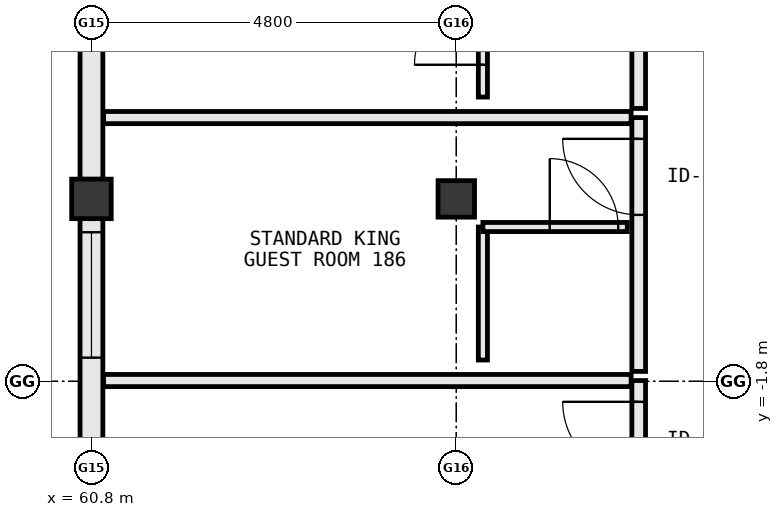
"""IFC4 building model, lengths in metres.
Left out: names, types, materials, properties, quantities, classifications, styles, units other than length and angle.
Written with IfcOpenShell. Run it as: python <this file> out.ifc"""

import sys

from ifc_helpers import new_model, si_unit, direction, frame, frame_2d, origin, origin_2d, place, context, subcontext, project, spatial, rectangle, extrude, element, fill, save


model = new_model("IFC4")
c1 = context("Model", 3, precision=1e-05, world=origin(), true_north=direction((0.0, 1.0)))
c2 = subcontext(c1, "Body", "Model", "MODEL_VIEW")
j1 = project(units=[si_unit("LENGTHUNIT", "METRE"), si_unit("PLANEANGLEUNIT", "RADIAN")], contexts=[c1])
p1 = place(None, origin())
s1 = spatial("IfcSite", under=j1, at=p1, CompositionType="ELEMENT")
p2 = place(p1, origin())
s2 = spatial("IfcBuilding", under=s1, at=p2, CompositionType="ELEMENT")
p3 = place(p2, frame((0.0, 0.0, 27.6)))
s3 = spatial("IfcBuildingStorey", under=s2, at=p3, CompositionType="ELEMENT", Elevation=27.6)
p4 = place(p3, frame((60.8, 0.6, 0.0), z_axis=(0.0, 0.0, 1.0), x_axis=(1.0, 0.0, 0.0)))
e1 = element("IfcColumn", 1, at=p4, inside=s3, PredefinedType="COLUMN", context=c2, shape_type="SweptSolid", body=[
    extrude(rectangle(XDim=0.52, YDim=0.52, at=origin_2d()), origin(), (0.0, 0.0, 1.0), 3.8),
])
p5 = place(p3, frame((65.6, 0.6, 0.0), z_axis=(0.0, 0.0, 1.0), x_axis=(1.0, 0.0, 0.0)))
e2 = element("IfcColumn", 2, at=p5, inside=s3, PredefinedType="COLUMN", context=c2, shape_type="SweptSolid", body=[
    extrude(rectangle(XDim=0.48, YDim=0.48, at=origin_2d()), origin(), (0.0, 0.0, 1.0), 3.8),
])
p6 = place(p3, frame((60.8, 9.942, 0.0), z_axis=(0.0, 0.0, 1.0), x_axis=(0.0, -1.0, 0.0)))
e3 = element("IfcWall", 3, at=p6, inside=s3, PredefinedType="STANDARD", context=c2, shape_type="SweptSolid", body=[
    extrude(rectangle(XDim=9.084, YDim=0.3, at=frame_2d((4.542, 0.0))), origin(), (0.0, 0.0, 1.0), 2.91),
])
p7 = place(p6, frame((5.582, 0.0, 0.85)))
e4 = element("IfcOpeningElement", 4, at=p7, cuts=e3, PredefinedType="OPENING", context=c2, shape_type="SweptSolid", body=[
    extrude(rectangle(XDim=1.8, YDim=1.85, at=frame_2d((0.9, 0.925))), frame((0.0, 0.162, 0.0), z_axis=(0.0, -1.0, 0.0), x_axis=(1.0, 0.0, 0.0)), (0.0, 0.0, 1.0), 0.324),
])
p8 = place(p6, frame((2.122, 0.0, 0.85)))
e5 = element("IfcOpeningElement", 5, at=p8, cuts=e3, PredefinedType="OPENING", context=c2, shape_type="SweptSolid", body=[
    extrude(rectangle(XDim=1.8, YDim=1.85, at=frame_2d((0.9, 0.925))), frame((0.0, 0.162, 0.0), z_axis=(0.0, -1.0, 0.0), x_axis=(1.0, 0.0, 0.0)), (0.0, 0.0, 1.0), 0.324),
])
p9 = place(p3, frame((60.8, 0.342, 0.0), z_axis=(0.0, 0.0, 1.0), x_axis=(0.0, -1.0, 0.0)))
e6 = element("IfcWall", 6, at=p9, inside=s3, PredefinedType="STANDARD", context=c2, shape_type="SweptSolid", body=[
    extrude(rectangle(XDim=9.084, YDim=0.3, at=frame_2d((4.542, 0.0))), origin(), (0.0, 0.0, 1.0), 2.91),
])
p10 = place(p9, frame((5.988, 0.0, 0.85)))
e7 = element("IfcOpeningElement", 7, at=p10, cuts=e6, PredefinedType="OPENING", context=c2, shape_type="SweptSolid", body=[
    extrude(rectangle(XDim=1.65, YDim=1.8, at=frame_2d((0.825, 0.9))), frame((0.0, 0.162, 0.0), z_axis=(0.0, -1.0, 0.0), x_axis=(1.0, 0.0, 0.0)), (0.0, 0.0, 1.0), 0.324),
])
p11 = place(p9, frame((2.902, 0.0, 0.85)))
e8 = element("IfcOpeningElement", 8, at=p11, cuts=e6, PredefinedType="OPENING", context=c2, shape_type="SweptSolid", body=[
    extrude(rectangle(XDim=1.8, YDim=1.85, at=frame_2d((0.9, 0.925))), frame((0.0, 0.162, 0.0), z_axis=(0.0, -1.0, 0.0), x_axis=(1.0, 0.0, 0.0)), (0.0, 0.0, 1.0), 0.324),
])
p12 = place(p9, frame((0.181, 0.0, 0.85)))
e9 = element("IfcOpeningElement", 9, at=p12, cuts=e6, PredefinedType="OPENING", context=c2, shape_type="SweptSolid", body=[
    extrude(rectangle(XDim=1.65, YDim=1.8, at=frame_2d((0.825, 0.9))), frame((0.0, 0.162, 0.0), z_axis=(0.0, -1.0, 0.0), x_axis=(1.0, 0.0, 0.0)), (0.0, 0.0, 1.0), 0.324),
])
p13 = place(p3, frame((68.0, -5.13, 0.0), z_axis=(0.0, 0.0, 1.0), x_axis=(0.0, 1.0, 0.0)))
e10 = element("IfcWall", 10, at=p13, inside=s3, PredefinedType="PARTITIONING", context=c2, shape_type="SweptSolid", body=[
    extrude(rectangle(XDim=3.34, YDim=0.18, at=frame_2d((1.67, 0.0))), origin(), (0.0, 0.0, 1.0), 3.555),
])
p14 = place(p13, frame((2.06, 0.0, 0.0)))
e11 = element("IfcOpeningElement", 11, at=p14, cuts=e10, PredefinedType="OPENING", context=c2, shape_type="SweptSolid", body=[
    extrude(rectangle(XDim=1.0, YDim=2.2, at=frame_2d((0.5, 1.1))), frame((0.0, 0.102, 0.0), z_axis=(0.0, -1.0, 0.0), x_axis=(1.0, 0.0, 0.0)), (0.0, 0.0, 1.0), 0.204),
])
p15 = place(p3, frame((60.96, -1.79, 0.0), z_axis=(0.0, 0.0, 1.0), x_axis=(1.0, 0.0, 0.0)))
e12 = element("IfcWall", 12, at=p15, inside=s3, PredefinedType="PARTITIONING", context=c2, shape_type="SweptSolid", body=[
    extrude(rectangle(XDim=6.94, YDim=0.16, at=frame_2d((3.47, 0.0))), origin(), (0.0, 0.0, 1.0), 3.555),
])
p16 = place(p3, frame((68.0, -1.67, 0.0), z_axis=(0.0, 0.0, 1.0), x_axis=(0.0, 1.0, 0.0)))
e13 = element("IfcWall", 13, at=p16, inside=s3, PredefinedType="PARTITIONING", context=c2, shape_type="SweptSolid", body=[
    extrude(rectangle(XDim=3.34, YDim=0.18, at=frame_2d((1.67, 0.0))), origin(), (0.0, 0.0, 1.0), 3.555),
])
p17 = place(p16, frame((2.06, 0.0, 0.0)))
e14 = element("IfcOpeningElement", 14, at=p17, cuts=e13, PredefinedType="OPENING", context=c2, shape_type="SweptSolid", body=[
    extrude(rectangle(XDim=1.0, YDim=2.2, at=frame_2d((0.5, 1.1))), frame((0.0, 0.102, 0.0), z_axis=(0.0, -1.0, 0.0), x_axis=(1.0, 0.0, 0.0)), (0.0, 0.0, 1.0), 0.204),
])
p18 = place(p3, frame((60.96, 1.67, 0.0), z_axis=(0.0, 0.0, 1.0), x_axis=(1.0, 0.0, 0.0)))
e15 = element("IfcWall", 15, at=p18, inside=s3, PredefinedType="PARTITIONING", context=c2, shape_type="SweptSolid", body=[
    extrude(rectangle(XDim=6.94, YDim=0.16, at=frame_2d((3.47, 0.0))), origin(), (0.0, 0.0, 1.0), 3.555),
])
p19 = place(p3, frame((65.95, -1.52, 0.0), z_axis=(0.0, 0.0, 1.0), x_axis=(0.0, 1.0, 0.0)))
e16 = element("IfcWall", 16, at=p19, inside=s3, PredefinedType="PARTITIONING", context=c2, shape_type="SweptSolid", body=[
    extrude(rectangle(XDim=1.75, YDim=0.12, at=frame_2d((0.875, 0.0))), origin(), (0.0, 0.0, 1.0), 2.91),
])
p20 = place(p3, frame((65.95, 0.23, 0.0), z_axis=(0.0, 0.0, 1.0), x_axis=(1.0, 0.0, 0.0)))
e17 = element("IfcWall", 17, at=p20, inside=s3, PredefinedType="PARTITIONING", context=c2, shape_type="SweptSolid", body=[
    extrude(rectangle(XDim=1.9, YDim=0.12, at=frame_2d((0.95, 0.0))), origin(), (0.0, 0.0, 1.0), 2.93),
])
p21 = place(p20, frame((0.88, 0.0, 0.0)))
e18 = element("IfcOpeningElement", 18, at=p21, cuts=e17, PredefinedType="OPENING", context=c2, shape_type="SweptSolid", body=[
    extrude(rectangle(XDim=0.9, YDim=2.15, at=frame_2d((0.45, 1.075))), frame((0.0, 0.072, 0.0), z_axis=(0.0, -1.0, 0.0), x_axis=(1.0, 0.0, 0.0)), (0.0, 0.0, 1.0), 0.144),
])
p22 = place(p3, frame((68.0, 1.79, 0.0), z_axis=(0.0, 0.0, 1.0), x_axis=(0.0, 1.0, 0.0)))
e19 = element("IfcWall", 19, at=p22, inside=s3, PredefinedType="PARTITIONING", context=c2, shape_type="SweptSolid", body=[
    extrude(rectangle(XDim=3.34, YDim=0.18, at=frame_2d((1.67, 0.0))), origin(), (0.0, 0.0, 1.0), 3.555),
])
p23 = place(p22, frame((2.06, 0.0, 0.0)))
e20 = element("IfcOpeningElement", 20, at=p23, cuts=e19, PredefinedType="OPENING", context=c2, shape_type="SweptSolid", body=[
    extrude(rectangle(XDim=1.0, YDim=2.2, at=frame_2d((0.5, 1.1))), frame((0.0, 0.102, 0.0), z_axis=(0.0, -1.0, 0.0), x_axis=(1.0, 0.0, 0.0)), (0.0, 0.0, 1.0), 0.204),
])
p24 = place(p3, frame((65.95, 1.94, 0.0), z_axis=(0.0, 0.0, 1.0), x_axis=(0.0, 1.0, 0.0)))
e21 = element("IfcWall", 21, at=p24, inside=s3, PredefinedType="PARTITIONING", context=c2, shape_type="SweptSolid", body=[
    extrude(rectangle(XDim=1.75, YDim=0.12, at=frame_2d((0.875, 0.0))), origin(), (0.0, 0.0, 1.0), 2.91),
])
p25 = place(p24, frame((0.425, 0.0, 0.0)))
e22 = element("IfcOpeningElement", 22, at=p25, cuts=e21, PredefinedType="OPENING", context=c2, shape_type="SweptSolid", body=[
    extrude(rectangle(XDim=0.9, YDim=2.15, at=frame_2d((0.45, 1.075))), frame((0.0, 0.072, 0.0), z_axis=(0.0, -1.0, 0.0), x_axis=(1.0, 0.0, 0.0)), (0.0, 0.0, 1.0), 0.144),
])
p26 = place(p12, origin())
e23 = element("IfcWindow", 23, at=p26, inside=s3, PartitioningType="SINGLE_PANEL", PredefinedType="WINDOW", context=c2, shape_type="SweptSolid", body=[
    extrude(rectangle(XDim=1.65, YDim=1.8, at=frame_2d((0.825, 0.9))), frame((0.0, 0.03, 0.0), z_axis=(0.0, -1.0, 0.0), x_axis=(1.0, 0.0, 0.0)), (0.0, 0.0, 1.0), 0.06),
])
fill(e9, e23)
p27 = place(p14, origin())
e24 = element("IfcDoor", 24, at=p27, inside=s3, OperationType="SINGLE_SWING_RIGHT", PredefinedType="DOOR", context=c2, shape_type="SweptSolid", body=[
    extrude(rectangle(XDim=1.0, YDim=2.2, at=frame_2d((0.5, 1.1))), frame((0.0, 0.025, 0.0), z_axis=(0.0, -1.0, 0.0), x_axis=(1.0, 0.0, 0.0)), (0.0, 0.0, 1.0), 0.05),
])
fill(e11, e24)
p28 = place(p17, origin())
e25 = element("IfcDoor", 25, at=p28, inside=s3, OperationType="SINGLE_SWING_RIGHT", PredefinedType="DOOR", context=c2, shape_type="SweptSolid", body=[
    extrude(rectangle(XDim=1.0, YDim=2.2, at=frame_2d((0.5, 1.1))), frame((0.0, 0.025, 0.0), z_axis=(0.0, -1.0, 0.0), x_axis=(1.0, 0.0, 0.0)), (0.0, 0.0, 1.0), 0.05),
])
fill(e14, e25)
p29 = place(p21, origin())
e26 = element("IfcDoor", 26, at=p29, inside=s3, OperationType="SINGLE_SWING_LEFT", PredefinedType="DOOR", context=c2, shape_type="SweptSolid", body=[
    extrude(rectangle(XDim=0.9, YDim=2.15, at=frame_2d((0.45, 1.075))), frame((0.0, 0.025, 0.0), z_axis=(0.0, -1.0, 0.0), x_axis=(1.0, 0.0, 0.0)), (0.0, 0.0, 1.0), 0.05),
])
fill(e18, e26)
p30 = place(p25, origin())
e27 = element("IfcDoor", 27, at=p30, inside=s3, OperationType="SINGLE_SWING_LEFT", PredefinedType="DOOR", context=c2, shape_type="SweptSolid", body=[
    extrude(rectangle(XDim=0.9, YDim=2.15, at=frame_2d((0.45, 1.075))), frame((0.0, 0.025, 0.0), z_axis=(0.0, -1.0, 0.0), x_axis=(1.0, 0.0, 0.0)), (0.0, 0.0, 1.0), 0.05),
])
fill(e22, e27)
save(model, sys.argv[1])
